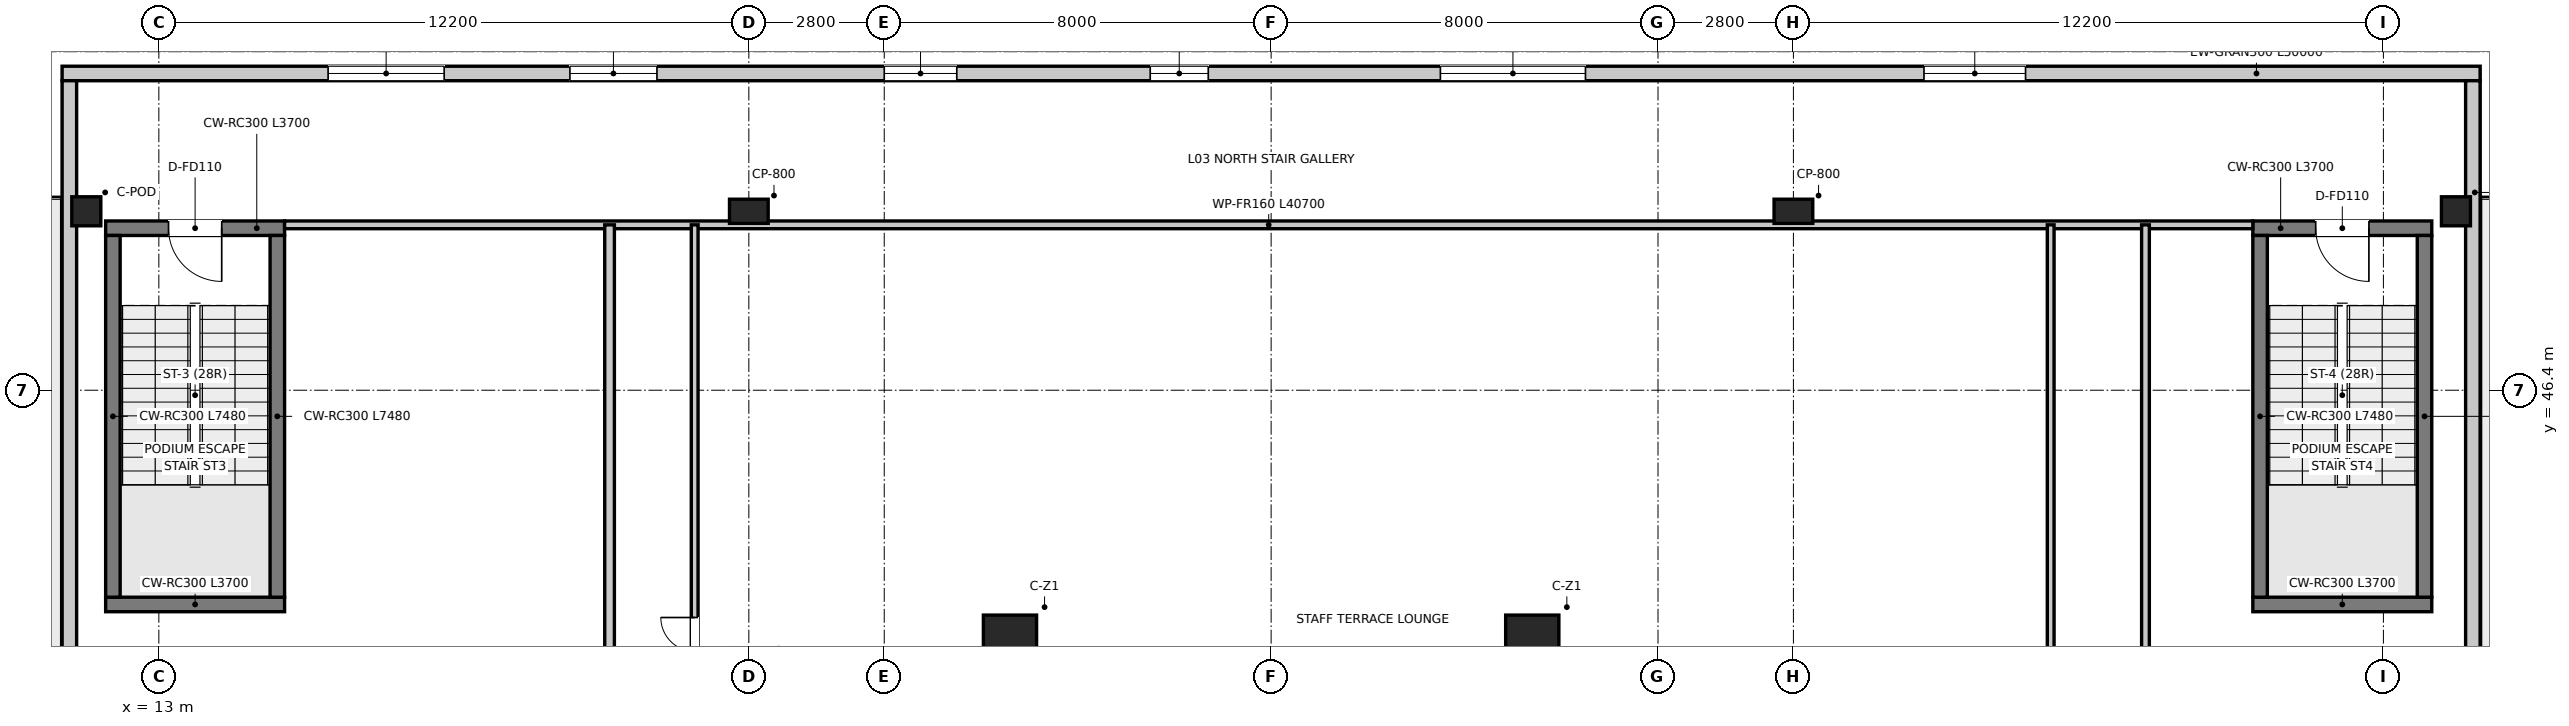
"""IFC4 building model, lengths in metres.
Left out: names, types, materials, properties, quantities, classifications, styles, units other than length and angle.
Written with IfcOpenShell. Run it as: python <this file> out.ifc"""

import sys

from ifc_helpers import new_model, si_unit, direction, frame, frame_2d, origin, origin_2d, place, context, subcontext, project, spatial, rectangle, extrude, source, transform, mapped, element, fill, save


model = new_model("IFC4")
c1 = context("Model", 3, precision=1e-05, world=origin(), true_north=direction((0.0, 1.0)))
c2 = subcontext(c1, "Body", "Model", "MODEL_VIEW")
j1 = project(units=[si_unit("LENGTHUNIT", "METRE"), si_unit("PLANEANGLEUNIT", "RADIAN")], contexts=[c1])
p1 = place(None, origin())
s1 = spatial("IfcSite", under=j1, at=p1, CompositionType="ELEMENT")
p2 = place(p1, origin())
s2 = spatial("IfcBuilding", under=s1, at=p2, CompositionType="ELEMENT")
p3 = place(p2, frame((0.0, 0.0, 15.4)))
s3 = spatial("IfcBuildingStorey", under=s2, at=p3, CompositionType="ELEMENT", Elevation=15.4)
p4 = place(p3, frame((11.9, 41.97, 0.0), z_axis=(0.0, 0.0, 1.0), x_axis=(1.0, 0.0, 0.0)))
e1 = element("IfcWall", 1, at=p4, inside=s3, PredefinedType="SHEAR", context=c2, shape_type="SweptSolid", body=[
    extrude(rectangle(XDim=3.7, YDim=0.3, at=frame_2d((1.85, 0.0))), origin(), (0.0, 0.0, 1.0), 4.6),
])
p5 = place(p3, frame((15.6, 49.75, 0.0), z_axis=(0.0, 0.0, 1.0), x_axis=(-1.0, 0.0, 0.0)))
e2 = element("IfcWall", 2, at=p5, inside=s3, PredefinedType="SHEAR", context=c2, shape_type="SweptSolid", body=[
    extrude(rectangle(XDim=3.7, YDim=0.3, at=frame_2d((1.85, 0.0))), origin(), (0.0, 0.0, 1.0), 4.6),
])
p6 = place(p5, frame((1.3, 0.0, 0.0)))
e3 = element("IfcOpeningElement", 3, at=p6, cuts=e2, PredefinedType="OPENING", context=c2, shape_type="SweptSolid", body=[
    extrude(rectangle(XDim=1.1, YDim=2.15, at=frame_2d((0.55, 1.075))), frame((0.0, 0.16, 0.0), z_axis=(0.0, -1.0, 0.0), x_axis=(1.0, 0.0, 0.0)), (0.0, 0.0, 1.0), 0.32),
])
for number, where, z_axis, x_axis in (
    (4, (12.05, 42.12, 0.0), (0.0, 0.0, 1.0), (0.0, 1.0, 0.0)),
    (5, (15.45, 42.12, 0.0), (0.0, 0.0, 1.0), (0.0, 1.0, 0.0)),
):
    element("IfcWall", number, at=place(p3, frame(where, z_axis=z_axis, x_axis=x_axis)), inside=s3, PredefinedType="SHEAR", context=c2, shape_type="SweptSolid", body=[
        extrude(rectangle(XDim=7.48, YDim=0.3, at=frame_2d((3.74, 0.0))), origin(), (0.0, 0.0, 1.0), 4.6),
    ])
p7 = place(p3, frame((56.3, 41.97, 0.0), z_axis=(0.0, 0.0, 1.0), x_axis=(1.0, 0.0, 0.0)))
e6 = element("IfcWall", 6, at=p7, inside=s3, PredefinedType="SHEAR", context=c2, shape_type="SweptSolid", body=[
    extrude(rectangle(XDim=3.7, YDim=0.3, at=frame_2d((1.85, 0.0))), origin(), (0.0, 0.0, 1.0), 4.6),
])
p8 = place(p3, frame((60.0, 49.75, 0.0), z_axis=(0.0, 0.0, 1.0), x_axis=(-1.0, 0.0, 0.0)))
e7 = element("IfcWall", 7, at=p8, inside=s3, PredefinedType="SHEAR", context=c2, shape_type="SweptSolid", body=[
    extrude(rectangle(XDim=3.7, YDim=0.3, at=frame_2d((1.85, 0.0))), origin(), (0.0, 0.0, 1.0), 4.6),
])
p9 = place(p8, frame((1.3, 0.0, 0.0)))
e8 = element("IfcOpeningElement", 8, at=p9, cuts=e7, PredefinedType="OPENING", context=c2, shape_type="SweptSolid", body=[
    extrude(rectangle(XDim=1.1, YDim=2.15, at=frame_2d((0.55, 1.075))), frame((0.0, 0.16, 0.0), z_axis=(0.0, -1.0, 0.0), x_axis=(1.0, 0.0, 0.0)), (0.0, 0.0, 1.0), 0.32),
])
for number, where, z_axis, x_axis in (
    (9, (56.45, 42.12, 0.0), (0.0, 0.0, 1.0), (0.0, 1.0, 0.0)),
    (10, (59.85, 42.12, 0.0), (0.0, 0.0, 1.0), (0.0, 1.0, 0.0)),
):
    element("IfcWall", number, at=place(p3, frame(where, z_axis=z_axis, x_axis=x_axis)), inside=s3, PredefinedType="SHEAR", context=c2, shape_type="SweptSolid", body=[
        extrude(rectangle(XDim=7.48, YDim=0.3, at=frame_2d((3.74, 0.0))), origin(), (0.0, 0.0, 1.0), 4.6),
    ])
m1 = source(origin(), c2, "Body", "SweptSolid", [
    extrude(rectangle(XDim=1.1, YDim=1.1, at=origin_2d()), origin(), (0.0, 0.0, 1.0), 4.6),
])
for number, where, z_axis, x_axis in (
    (11, (30.6, 41.2, 0.0), (0.0, 0.0, 1.0), (1.0, 0.0, 0.0)),
    (12, (41.4, 41.2, 0.0), (0.0, 0.0, 1.0), (1.0, 0.0, 0.0)),
):
    element("IfcColumn", number, at=place(p3, frame(where, z_axis=z_axis, x_axis=x_axis)), inside=s3, PredefinedType="COLUMN", context=c2, shape_type="MappedRepresentation", body=[
        mapped(m1, transform((0.0, 0.0, 0.0), x_axis=(1.0, 0.0, 0.0), y_axis=(0.0, 1.0, 0.0), z_axis=(0.0, 0.0, 1.0), scale=1.0)),
    ])
m2 = source(origin(), c2, "Body", "SweptSolid", [
    extrude(rectangle(XDim=0.6, YDim=0.6, at=origin_2d()), origin(), (0.0, 0.0, 1.0), 4.6),
])
for number, where, z_axis, x_axis in (
    (13, (11.5, 50.1, 0.0), (0.0, 0.0, 1.0), (1.0, 0.0, 0.0)),
    (14, (60.5, 50.1, 0.0), (0.0, 0.0, 1.0), (1.0, 0.0, 0.0)),
):
    element("IfcColumn", number, at=place(p3, frame(where, z_axis=z_axis, x_axis=x_axis)), inside=s3, PredefinedType="COLUMN", context=c2, shape_type="MappedRepresentation", body=[
        mapped(m2, transform((0.0, 0.0, 0.0), x_axis=(1.0, 0.0, 0.0), y_axis=(0.0, 1.0, 0.0), z_axis=(0.0, 0.0, 1.0), scale=1.0)),
    ])
m3 = source(origin(), c2, "Body", "SweptSolid", [
    extrude(rectangle(XDim=0.8, YDim=0.5, at=origin_2d()), origin(), (0.0, 0.0, 1.0), 4.6),
])
for number, where, z_axis, x_axis in (
    (15, (25.2, 50.1, 0.0), (0.0, 0.0, 1.0), (1.0, 0.0, 0.0)),
    (16, (46.8, 50.1, 0.0), (0.0, 0.0, 1.0), (1.0, 0.0, 0.0)),
):
    element("IfcColumn", number, at=place(p3, frame(where, z_axis=z_axis, x_axis=x_axis)), inside=s3, PredefinedType="PILASTER", context=c2, shape_type="MappedRepresentation", body=[
        mapped(m3, transform((0.0, 0.0, 0.0), x_axis=(1.0, 0.0, 0.0), y_axis=(0.0, 1.0, 0.0), z_axis=(0.0, 0.0, 1.0), scale=1.0)),
    ])
p10 = place(p3, frame((11.0, 52.95, 0.0), z_axis=(0.0, 0.0, 1.0), x_axis=(1.0, 0.0, 0.0)))
e17 = element("IfcWall", 17, at=p10, inside=s3, PredefinedType="SOLIDWALL", context=c2, shape_type="SweptSolid", body=[
    extrude(rectangle(XDim=50.0, YDim=0.3, at=frame_2d((25.0, 0.0))), origin(), (0.0, 0.0, 1.0), 4.25),
])
p11 = place(p10, frame((5.5, 0.0, 0.9)))
e18 = element("IfcOpeningElement", 18, at=p11, cuts=e17, PredefinedType="OPENING", context=c2, shape_type="SweptSolid", body=[
    extrude(rectangle(XDim=2.4, YDim=2.6, at=frame_2d((1.2, 1.3))), frame((0.0, 0.16, 0.0), z_axis=(0.0, -1.0, 0.0), x_axis=(1.0, 0.0, 0.0)), (0.0, 0.0, 1.0), 0.32),
])
p12 = place(p10, frame((10.5, 0.0, 0.9)))
e19 = element("IfcOpeningElement", 19, at=p12, cuts=e17, PredefinedType="OPENING", context=c2, shape_type="SweptSolid", body=[
    extrude(rectangle(XDim=1.8, YDim=2.6, at=frame_2d((0.9, 1.3))), frame((0.0, 0.16, 0.0), z_axis=(0.0, -1.0, 0.0), x_axis=(1.0, 0.0, 0.0)), (0.0, 0.0, 1.0), 0.32),
])
p13 = place(p10, frame((17.0, 0.0, 0.95)))
e20 = element("IfcOpeningElement", 20, at=p13, cuts=e17, PredefinedType="OPENING", context=c2, shape_type="SweptSolid", body=[
    extrude(rectangle(XDim=1.5, YDim=2.4, at=frame_2d((0.75, 1.2))), frame((0.0, 0.16, 0.0), z_axis=(0.0, -1.0, 0.0), x_axis=(1.0, 0.0, 0.0)), (0.0, 0.0, 1.0), 0.32),
])
p14 = place(p10, frame((22.5, 0.0, 0.95)))
e21 = element("IfcOpeningElement", 21, at=p14, cuts=e17, PredefinedType="OPENING", context=c2, shape_type="SweptSolid", body=[
    extrude(rectangle(XDim=1.2, YDim=2.4, at=frame_2d((0.6, 1.2))), frame((0.0, 0.16, 0.0), z_axis=(0.0, -1.0, 0.0), x_axis=(1.0, 0.0, 0.0)), (0.0, 0.0, 1.0), 0.32),
])
p15 = place(p10, frame((28.5, 0.0, 0.9)))
e22 = element("IfcOpeningElement", 22, at=p15, cuts=e17, PredefinedType="OPENING", context=c2, shape_type="SweptSolid", body=[
    extrude(rectangle(XDim=3.0, YDim=2.6, at=frame_2d((1.5, 1.3))), frame((0.0, 0.16, 0.0), z_axis=(0.0, -1.0, 0.0), x_axis=(1.0, 0.0, 0.0)), (0.0, 0.0, 1.0), 0.32),
])
p16 = place(p10, frame((38.5, 0.0, 1.0)))
e23 = element("IfcOpeningElement", 23, at=p16, cuts=e17, PredefinedType="OPENING", context=c2, shape_type="SweptSolid", body=[
    extrude(rectangle(XDim=2.1, YDim=2.2, at=frame_2d((1.05, 1.1))), frame((0.0, 0.16, 0.0), z_axis=(0.0, -1.0, 0.0), x_axis=(1.0, 0.0, 0.0)), (0.0, 0.0, 1.0), 0.32),
])
p17 = place(p3, frame((11.15, 0.6, 0.0), z_axis=(0.0, 0.0, 1.0), x_axis=(0.0, 1.0, 0.0)))
e24 = element("IfcWall", 24, at=p17, inside=s3, PredefinedType="SOLIDWALL", context=c2, shape_type="SweptSolid", body=[
    extrude(rectangle(XDim=52.2, YDim=0.3, at=frame_2d((26.1, 0.0))), origin(), (0.0, 0.0, 1.0), 2.45),
])
p18 = place(p17, frame((20.0, 0.0, 0.0)))
e25 = element("IfcOpeningElement", 25, at=p18, cuts=e24, PredefinedType="OPENING", context=c2, shape_type="SweptSolid", body=[
    extrude(rectangle(XDim=1.6, YDim=2.15, at=frame_2d((0.8, 1.075))), frame((0.0, 0.16, 0.0), z_axis=(0.0, -1.0, 0.0), x_axis=(1.0, 0.0, 0.0)), (0.0, 0.0, 1.0), 0.32),
])
p19 = place(p3, frame((60.85, 52.8, 0.0), z_axis=(0.0, 0.0, 1.0), x_axis=(0.0, -1.0, 0.0)))
e26 = element("IfcWall", 26, at=p19, inside=s3, PredefinedType="SOLIDWALL", context=c2, shape_type="SweptSolid", body=[
    extrude(rectangle(XDim=52.2, YDim=0.3, at=frame_2d((26.1, 0.0))), origin(), (0.0, 0.0, 1.0), 4.25),
])
p20 = place(p19, frame((20.0, 0.0, 0.0)))
e27 = element("IfcOpeningElement", 27, at=p20, cuts=e26, PredefinedType="OPENING", context=c2, shape_type="SweptSolid", body=[
    extrude(rectangle(XDim=1.6, YDim=2.15, at=frame_2d((0.8, 1.075))), frame((0.0, 0.16, 0.0), z_axis=(0.0, -1.0, 0.0), x_axis=(1.0, 0.0, 0.0)), (0.0, 0.0, 1.0), 0.32),
])
p21 = place(p3, frame((15.6, 49.82, 0.0), z_axis=(0.0, 0.0, 1.0), x_axis=(1.0, 0.0, 0.0)))
e28 = element("IfcWall", 28, at=p21, inside=s3, PredefinedType="PARTITIONING", context=c2, shape_type="SweptSolid", body=[
    extrude(rectangle(XDim=40.7, YDim=0.16, at=frame_2d((20.35, 0.0))), origin(), (0.0, 0.0, 1.0), 3.56),
])
p22 = place(p3, frame((22.32, 0.605, 0.0), z_axis=(0.0, 0.0, 1.0), x_axis=(0.0, 1.0, 0.0)))
e29 = element("IfcWall", 29, at=p22, inside=s3, PredefinedType="PARTITIONING", context=c2, shape_type="SweptSolid", body=[
    extrude(rectangle(XDim=49.215, YDim=0.2, at=frame_2d((24.607, 0.0))), origin(), (0.0, 0.0, 1.0), 3.55),
])
p23 = place(p22, frame((26.695, 0.0, 0.0)))
e30 = element("IfcOpeningElement", 30, at=p23, cuts=e29, PredefinedType="OPENING", context=c2, shape_type="SweptSolid", body=[
    extrude(rectangle(XDim=1.4, YDim=2.2, at=frame_2d((0.7, 1.1))), frame((0.0, 0.11, 0.0), z_axis=(0.0, -1.0, 0.0), x_axis=(1.0, 0.0, 0.0)), (0.0, 0.0, 1.0), 0.22),
])
p24 = place(p3, frame((24.08, 29.1, 0.0), z_axis=(0.0, 0.0, 1.0), x_axis=(0.0, 1.0, 0.0)))
e31 = element("IfcWall", 31, at=p24, inside=s3, PredefinedType="PARTITIONING", context=c2, shape_type="SweptSolid", body=[
    extrude(rectangle(XDim=20.72, YDim=0.14, at=frame_2d((10.36, 0.0))), origin(), (0.0, 0.0, 1.0), 3.55),
])
p25 = place(p24, frame((11.2, 0.0, 0.0)))
e32 = element("IfcOpeningElement", 32, at=p25, cuts=e31, PredefinedType="OPENING", context=c2, shape_type="SweptSolid", body=[
    extrude(rectangle(XDim=1.4, YDim=2.2, at=frame_2d((0.7, 1.1))), frame((0.0, 0.08, 0.0), z_axis=(0.0, -1.0, 0.0), x_axis=(1.0, 0.0, 0.0)), (0.0, 0.0, 1.0), 0.16),
])
p26 = place(p3, frame((52.12, 29.1, 0.0), z_axis=(0.0, 0.0, 1.0), x_axis=(0.0, 1.0, 0.0)))
e33 = element("IfcWall", 33, at=p26, inside=s3, PredefinedType="PARTITIONING", context=c2, shape_type="SweptSolid", body=[
    extrude(rectangle(XDim=20.72, YDim=0.14, at=frame_2d((10.36, 0.0))), origin(), (0.0, 0.0, 1.0), 3.61),
])
p27 = place(p3, frame((54.08, 0.605, 0.0), z_axis=(0.0, 0.0, 1.0), x_axis=(0.0, 1.0, 0.0)))
e34 = element("IfcWall", 34, at=p27, inside=s3, PredefinedType="PARTITIONING", context=c2, shape_type="SweptSolid", body=[
    extrude(rectangle(XDim=49.215, YDim=0.16, at=frame_2d((24.607, 0.0))), origin(), (0.0, 0.0, 1.0), 3.61),
])
p28 = place(p27, frame((26.845, 0.0, 0.0)))
e35 = element("IfcOpeningElement", 35, at=p28, cuts=e34, PredefinedType="OPENING", context=c2, shape_type="SweptSolid", body=[
    extrude(rectangle(XDim=1.1, YDim=2.15, at=frame_2d((0.55, 1.075))), frame((0.0, 0.09, 0.0), z_axis=(0.0, -1.0, 0.0), x_axis=(1.0, 0.0, 0.0)), (0.0, 0.0, 1.0), 0.18),
])
p29 = place(p11, origin())
e36 = element("IfcWindow", 36, at=p29, inside=s3, PartitioningType="SINGLE_PANEL", PredefinedType="WINDOW", context=c2, shape_type="SweptSolid", body=[
    extrude(rectangle(XDim=2.4, YDim=2.6, at=frame_2d((1.2, 1.3))), frame((0.0, 0.03, 0.0), z_axis=(0.0, -1.0, 0.0), x_axis=(1.0, 0.0, 0.0)), (0.0, 0.0, 1.0), 0.06),
])
fill(e18, e36)
p30 = place(p12, origin())
e37 = element("IfcWindow", 37, at=p30, inside=s3, PartitioningType="SINGLE_PANEL", PredefinedType="WINDOW", context=c2, shape_type="SweptSolid", body=[
    extrude(rectangle(XDim=1.8, YDim=2.6, at=frame_2d((0.9, 1.3))), frame((0.0, 0.03, 0.0), z_axis=(0.0, -1.0, 0.0), x_axis=(1.0, 0.0, 0.0)), (0.0, 0.0, 1.0), 0.06),
])
fill(e19, e37)
p31 = place(p13, origin())
e38 = element("IfcWindow", 38, at=p31, inside=s3, PartitioningType="SINGLE_PANEL", PredefinedType="WINDOW", context=c2, shape_type="SweptSolid", body=[
    extrude(rectangle(XDim=1.5, YDim=2.4, at=frame_2d((0.75, 1.2))), frame((0.0, 0.03, 0.0), z_axis=(0.0, -1.0, 0.0), x_axis=(1.0, 0.0, 0.0)), (0.0, 0.0, 1.0), 0.06),
])
fill(e20, e38)
p32 = place(p14, origin())
e39 = element("IfcWindow", 39, at=p32, inside=s3, PartitioningType="SINGLE_PANEL", PredefinedType="WINDOW", context=c2, shape_type="SweptSolid", body=[
    extrude(rectangle(XDim=1.2, YDim=2.4, at=frame_2d((0.6, 1.2))), frame((0.0, 0.03, 0.0), z_axis=(0.0, -1.0, 0.0), x_axis=(1.0, 0.0, 0.0)), (0.0, 0.0, 1.0), 0.06),
])
fill(e21, e39)
p33 = place(p15, origin())
e40 = element("IfcWindow", 40, at=p33, inside=s3, PartitioningType="SINGLE_PANEL", PredefinedType="WINDOW", context=c2, shape_type="SweptSolid", body=[
    extrude(rectangle(XDim=3.0, YDim=2.6, at=frame_2d((1.5, 1.3))), frame((0.0, 0.03, 0.0), z_axis=(0.0, -1.0, 0.0), x_axis=(1.0, 0.0, 0.0)), (0.0, 0.0, 1.0), 0.06),
])
fill(e22, e40)
p34 = place(p16, origin())
e41 = element("IfcWindow", 41, at=p34, inside=s3, PartitioningType="SINGLE_PANEL", PredefinedType="WINDOW", context=c2, shape_type="SweptSolid", body=[
    extrude(rectangle(XDim=2.1, YDim=2.2, at=frame_2d((1.05, 1.1))), frame((0.0, 0.03, 0.0), z_axis=(0.0, -1.0, 0.0), x_axis=(1.0, 0.0, 0.0)), (0.0, 0.0, 1.0), 0.06),
])
fill(e23, e41)
p35 = place(p6, origin())
e42 = element("IfcDoor", 42, at=p35, inside=s3, OperationType="SINGLE_SWING_LEFT", PredefinedType="DOOR", context=c2, shape_type="SweptSolid", body=[
    extrude(rectangle(XDim=1.1, YDim=2.15, at=frame_2d((0.55, 1.075))), frame((0.0, 0.025, 0.0), z_axis=(0.0, -1.0, 0.0), x_axis=(1.0, 0.0, 0.0)), (0.0, 0.0, 1.0), 0.05),
])
fill(e3, e42)
p36 = place(p9, origin())
e43 = element("IfcDoor", 43, at=p36, inside=s3, OperationType="SINGLE_SWING_LEFT", PredefinedType="DOOR", context=c2, shape_type="SweptSolid", body=[
    extrude(rectangle(XDim=1.1, YDim=2.15, at=frame_2d((0.55, 1.075))), frame((0.0, 0.025, 0.0), z_axis=(0.0, -1.0, 0.0), x_axis=(1.0, 0.0, 0.0)), (0.0, 0.0, 1.0), 0.05),
])
fill(e8, e43)
p37 = place(p25, origin())
e44 = element("IfcDoor", 44, at=p37, inside=s3, OperationType="DOUBLE_DOOR_SINGLE_SWING", PredefinedType="DOOR", context=c2, shape_type="SweptSolid", body=[
    extrude(rectangle(XDim=1.4, YDim=2.2, at=frame_2d((0.7, 1.1))), frame((0.0, 0.025, 0.0), z_axis=(0.0, -1.0, 0.0), x_axis=(1.0, 0.0, 0.0)), (0.0, 0.0, 1.0), 0.05),
])
fill(e32, e44)
save(model, sys.argv[1])
